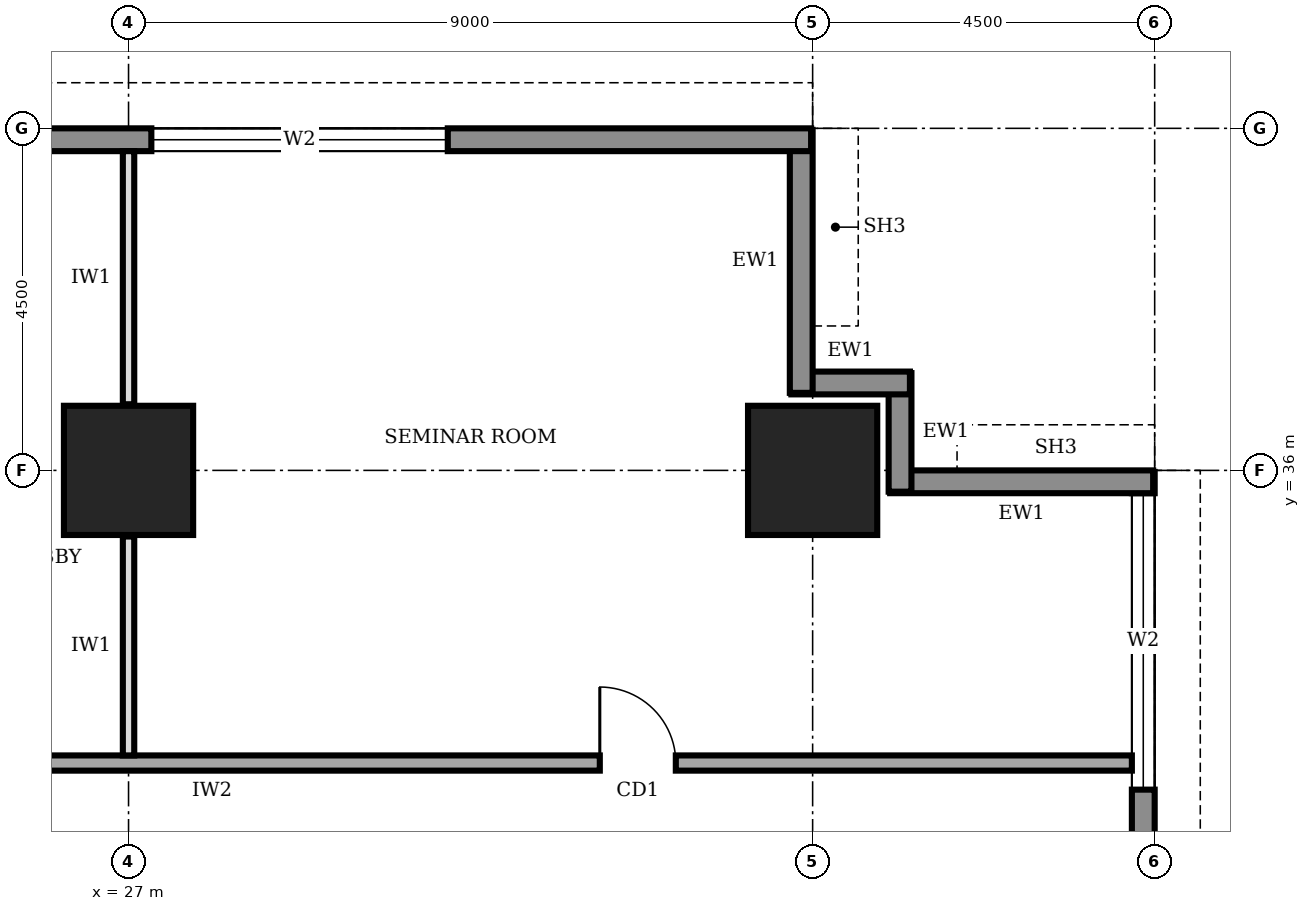
"""IFC4 building model, lengths in metres.
Left out: names, types, materials, properties, quantities, classifications, styles, units other than length and angle.
Written with IfcOpenShell. Run it as: python <this file> out.ifc"""

import sys

from ifc_helpers import new_model, si_unit, direction, frame, frame_2d, origin, origin_2d, place, context, subcontext, project, spatial, rectangle, extrude, element, fill, save


model = new_model("IFC4")
c1 = context("Model", 3, precision=1e-05, world=origin(), true_north=direction((0.0, 1.0)))
c2 = subcontext(c1, "Body", "Model", "MODEL_VIEW")
j1 = project(units=[si_unit("LENGTHUNIT", "METRE"), si_unit("PLANEANGLEUNIT", "RADIAN")], contexts=[c1])
p1 = place(None, origin())
s1 = spatial("IfcSite", under=j1, at=p1, CompositionType="ELEMENT")
p2 = place(p1, origin())
s2 = spatial("IfcBuilding", under=s1, at=p2, CompositionType="ELEMENT")
p3 = place(p2, frame((0.0, 0.0, 165.0)))
s3 = spatial("IfcBuildingStorey", under=s2, at=p3, CompositionType="ELEMENT", Elevation=165.0)
for number, where, z_axis, x_axis in (
    (1, (27.0, 36.0, 0.0), (0.0, 0.0, 1.0), (1.0, 0.0, 0.0)),
    (2, (36.0, 36.0, 0.0), (0.0, 0.0, 1.0), (1.0, 0.0, 0.0)),
):
    element("IfcColumn", number, at=place(p3, frame(where, z_axis=z_axis, x_axis=x_axis)), inside=s3, PredefinedType="COLUMN", context=c2, shape_type="SweptSolid", body=[
        extrude(rectangle(XDim=1.7, YDim=1.7, at=origin_2d()), origin(), (0.0, 0.0, 1.0), 4.0),
    ])
p4 = place(p3, frame((40.35, 4.52, 0.0), z_axis=(0.0, 0.0, 1.0), x_axis=(0.0, 1.0, 0.0)))
e3 = element("IfcWall", 3, at=p4, inside=s3, PredefinedType="STANDARD", context=c2, shape_type="SweptSolid", body=[
    extrude(rectangle(XDim=31.46, YDim=0.3, at=frame_2d((15.73, 0.0))), origin(), (0.0, 0.0, 1.0), 3.75),
])
p5 = place(p4, frame((4.78, 0.0, 0.6)))
e4 = element("IfcOpeningElement", 4, at=p5, cuts=e3, PredefinedType="OPENING", context=c2, shape_type="SweptSolid", body=[
    extrude(rectangle(XDim=3.9, YDim=2.6, at=frame_2d((1.95, 1.3))), frame((0.0, 0.16, 0.0), z_axis=(0.0, -1.0, 0.0), x_axis=(1.0, 0.0, 0.0)), (0.0, 0.0, 1.0), 0.32),
])
p6 = place(p4, frame((9.28, 0.0, 0.6)))
e5 = element("IfcOpeningElement", 5, at=p6, cuts=e3, PredefinedType="OPENING", context=c2, shape_type="SweptSolid", body=[
    extrude(rectangle(XDim=3.9, YDim=2.6, at=frame_2d((1.95, 1.3))), frame((0.0, 0.16, 0.0), z_axis=(0.0, -1.0, 0.0), x_axis=(1.0, 0.0, 0.0)), (0.0, 0.0, 1.0), 0.32),
])
p7 = place(p4, frame((13.78, 0.0, 0.6)))
e6 = element("IfcOpeningElement", 6, at=p7, cuts=e3, PredefinedType="OPENING", context=c2, shape_type="SweptSolid", body=[
    extrude(rectangle(XDim=3.9, YDim=2.6, at=frame_2d((1.95, 1.3))), frame((0.0, 0.16, 0.0), z_axis=(0.0, -1.0, 0.0), x_axis=(1.0, 0.0, 0.0)), (0.0, 0.0, 1.0), 0.32),
])
p8 = place(p4, frame((18.28, 0.0, 0.6)))
e7 = element("IfcOpeningElement", 7, at=p8, cuts=e3, PredefinedType="OPENING", context=c2, shape_type="SweptSolid", body=[
    extrude(rectangle(XDim=3.9, YDim=2.6, at=frame_2d((1.95, 1.3))), frame((0.0, 0.16, 0.0), z_axis=(0.0, -1.0, 0.0), x_axis=(1.0, 0.0, 0.0)), (0.0, 0.0, 1.0), 0.32),
])
p9 = place(p4, frame((22.78, 0.0, 0.6)))
e8 = element("IfcOpeningElement", 8, at=p9, cuts=e3, PredefinedType="OPENING", context=c2, shape_type="SweptSolid", body=[
    extrude(rectangle(XDim=3.9, YDim=2.6, at=frame_2d((1.95, 1.3))), frame((0.0, 0.16, 0.0), z_axis=(0.0, -1.0, 0.0), x_axis=(1.0, 0.0, 0.0)), (0.0, 0.0, 1.0), 0.32),
])
p10 = place(p4, frame((27.28, 0.0, 0.6)))
e9 = element("IfcOpeningElement", 9, at=p10, cuts=e3, PredefinedType="OPENING", context=c2, shape_type="SweptSolid", body=[
    extrude(rectangle(XDim=3.9, YDim=2.6, at=frame_2d((1.95, 1.3))), frame((0.0, 0.16, 0.0), z_axis=(0.0, -1.0, 0.0), x_axis=(1.0, 0.0, 0.0)), (0.0, 0.0, 1.0), 0.32),
])
p11 = place(p3, frame((40.48, 35.85, 0.0), z_axis=(0.0, 0.0, 1.0), x_axis=(-1.0, 0.0, 0.0)))
e10 = element("IfcWall", 10, at=p11, inside=s3, PredefinedType="STANDARD", context=c2, shape_type="SweptSolid", body=[
    extrude(rectangle(XDim=3.46, YDim=0.3, at=frame_2d((1.73, 0.0))), origin(), (0.0, 0.0, 1.0), 2.75),
])
for number, where, z_axis, x_axis in (
    (11, (37.15, 35.72, 0.0), (0.0, 0.0, 1.0), (0.0, 1.0, 0.0)),
    (12, (37.28, 37.15, 0.0), (0.0, 0.0, 1.0), (-1.0, 0.0, 0.0)),
):
    element("IfcWall", number, at=place(p3, frame(where, z_axis=z_axis, x_axis=x_axis)), inside=s3, PredefinedType="STANDARD", context=c2, shape_type="SweptSolid", body=[
        extrude(rectangle(XDim=1.56, YDim=0.3, at=frame_2d((0.78, 0.0))), origin(), (0.0, 0.0, 1.0), 3.75),
    ])
p12 = place(p3, frame((35.85, 37.02, 0.0), z_axis=(0.0, 0.0, 1.0), x_axis=(0.0, 1.0, 0.0)))
e13 = element("IfcWall", 13, at=p12, inside=s3, PredefinedType="STANDARD", context=c2, shape_type="SweptSolid", body=[
    extrude(rectangle(XDim=3.46, YDim=0.3, at=frame_2d((1.73, 0.0))), origin(), (0.0, 0.0, 1.0), 2.75),
])
p13 = place(p3, frame((35.98, 40.35, 0.0), z_axis=(0.0, 0.0, 1.0), x_axis=(-1.0, 0.0, 0.0)))
e14 = element("IfcWall", 14, at=p13, inside=s3, PredefinedType="STANDARD", context=c2, shape_type="SweptSolid", body=[
    extrude(rectangle(XDim=31.46, YDim=0.3, at=frame_2d((15.73, 0.0))), origin(), (0.0, 0.0, 1.0), 3.75),
])
p14 = place(p13, frame((27.28, 0.0, 0.6)))
e15 = element("IfcOpeningElement", 15, at=p14, cuts=e14, PredefinedType="OPENING", context=c2, shape_type="SweptSolid", body=[
    extrude(rectangle(XDim=3.9, YDim=2.6, at=frame_2d((1.95, 1.3))), frame((0.0, 0.16, 0.0), z_axis=(0.0, -1.0, 0.0), x_axis=(1.0, 0.0, 0.0)), (0.0, 0.0, 1.0), 0.32),
])
p15 = place(p13, frame((22.78, 0.0, 0.6)))
e16 = element("IfcOpeningElement", 16, at=p15, cuts=e14, PredefinedType="OPENING", context=c2, shape_type="SweptSolid", body=[
    extrude(rectangle(XDim=3.9, YDim=2.6, at=frame_2d((1.95, 1.3))), frame((0.0, 0.16, 0.0), z_axis=(0.0, -1.0, 0.0), x_axis=(1.0, 0.0, 0.0)), (0.0, 0.0, 1.0), 0.32),
])
p16 = place(p13, frame((4.78, 0.0, 0.6)))
e17 = element("IfcOpeningElement", 17, at=p16, cuts=e14, PredefinedType="OPENING", context=c2, shape_type="SweptSolid", body=[
    extrude(rectangle(XDim=3.9, YDim=2.6, at=frame_2d((1.95, 1.3))), frame((0.0, 0.16, 0.0), z_axis=(0.0, -1.0, 0.0), x_axis=(1.0, 0.0, 0.0)), (0.0, 0.0, 1.0), 0.32),
])
p17 = place(p3, frame((40.2, 32.15, 0.0), z_axis=(0.0, 0.0, 1.0), x_axis=(-1.0, 0.0, 0.0)))
e18 = element("IfcWall", 18, at=p17, inside=s3, PredefinedType="SOLIDWALL", context=c2, shape_type="SweptSolid", body=[
    extrude(rectangle(XDim=28.5, YDim=0.2, at=frame_2d((14.25, 0.0))), origin(), (0.0, 0.0, 1.0), 3.75),
])
p18 = place(p17, frame((27.2, 0.0, 0.0)))
e19 = element("IfcOpeningElement", 19, at=p18, cuts=e18, PredefinedType="OPENING", context=c2, shape_type="SweptSolid", body=[
    extrude(rectangle(XDim=1.0, YDim=2.1, at=frame_2d((0.5, 1.05))), frame((0.0, 0.11, 0.0), z_axis=(0.0, -1.0, 0.0), x_axis=(1.0, 0.0, 0.0)), (0.0, 0.0, 1.0), 0.22),
])
p19 = place(p17, frame((23.95, 0.0, 0.0)))
e20 = element("IfcOpeningElement", 20, at=p19, cuts=e18, PredefinedType="OPENING", context=c2, shape_type="SweptSolid", body=[
    extrude(rectangle(XDim=1.0, YDim=2.1, at=frame_2d((0.5, 1.05))), frame((0.0, 0.11, 0.0), z_axis=(0.0, -1.0, 0.0), x_axis=(1.0, 0.0, 0.0)), (0.0, 0.0, 1.0), 0.22),
])
p20 = place(p17, frame((17.2, 0.0, 0.0)))
e21 = element("IfcOpeningElement", 21, at=p20, cuts=e18, PredefinedType="OPENING", context=c2, shape_type="SweptSolid", body=[
    extrude(rectangle(XDim=1.0, YDim=2.1, at=frame_2d((0.5, 1.05))), frame((0.0, 0.11, 0.0), z_axis=(0.0, -1.0, 0.0), x_axis=(1.0, 0.0, 0.0)), (0.0, 0.0, 1.0), 0.22),
])
p21 = place(p17, frame((6.0, 0.0, 0.0)))
e22 = element("IfcOpeningElement", 22, at=p21, cuts=e18, PredefinedType="OPENING", context=c2, shape_type="SweptSolid", body=[
    extrude(rectangle(XDim=1.0, YDim=2.1, at=frame_2d((0.5, 1.05))), frame((0.0, 0.11, 0.0), z_axis=(0.0, -1.0, 0.0), x_axis=(1.0, 0.0, 0.0)), (0.0, 0.0, 1.0), 0.22),
])
p22 = place(p3, frame((27.0, 32.25, 0.0), z_axis=(0.0, 0.0, 1.0), x_axis=(0.0, 1.0, 0.0)))
e23 = element("IfcWall", 23, at=p22, inside=s3, PredefinedType="PARTITIONING", context=c2, shape_type="SweptSolid", body=[
    extrude(rectangle(XDim=2.88, YDim=0.15, at=frame_2d((1.44, 0.0))), origin(), (0.0, 0.0, 1.0), 3.75),
])
p23 = place(p3, frame((27.0, 36.87, 0.0), z_axis=(0.0, 0.0, 1.0), x_axis=(0.0, 1.0, 0.0)))
e24 = element("IfcWall", 24, at=p23, inside=s3, PredefinedType="PARTITIONING", context=c2, shape_type="SweptSolid", body=[
    extrude(rectangle(XDim=3.33, YDim=0.15, at=frame_2d((1.665, 0.0))), origin(), (0.0, 0.0, 1.0), 2.75),
])
p24 = place(p10, origin())
e25 = element("IfcWindow", 25, at=p24, inside=s3, PartitioningType="SINGLE_PANEL", PredefinedType="WINDOW", context=c2, shape_type="SweptSolid", body=[
    extrude(rectangle(XDim=3.9, YDim=2.6, at=frame_2d((1.95, 1.3))), frame((0.0, 0.03, 0.0), z_axis=(0.0, -1.0, 0.0), x_axis=(1.0, 0.0, 0.0)), (0.0, 0.0, 1.0), 0.06),
])
fill(e9, e25)
p25 = place(p16, origin())
e26 = element("IfcWindow", 26, at=p25, inside=s3, PartitioningType="SINGLE_PANEL", PredefinedType="WINDOW", context=c2, shape_type="SweptSolid", body=[
    extrude(rectangle(XDim=3.9, YDim=2.6, at=frame_2d((1.95, 1.3))), frame((0.0, 0.03, 0.0), z_axis=(0.0, -1.0, 0.0), x_axis=(1.0, 0.0, 0.0)), (0.0, 0.0, 1.0), 0.06),
])
fill(e17, e26)
p26 = place(p21, frame((1.0, 0.0, 0.0), z_axis=(0.0, 0.0, 1.0), x_axis=(-1.0, 0.0, 0.0)))
e27 = element("IfcDoor", 27, at=p26, inside=s3, OperationType="SINGLE_SWING_LEFT", PredefinedType="DOOR", context=c2, shape_type="SweptSolid", body=[
    extrude(rectangle(XDim=1.0, YDim=2.1, at=frame_2d((0.5, 1.05))), frame((0.0, 0.025, 0.0), z_axis=(0.0, -1.0, 0.0), x_axis=(1.0, 0.0, 0.0)), (0.0, 0.0, 1.0), 0.05),
])
fill(e22, e27)
save(model, sys.argv[1])
